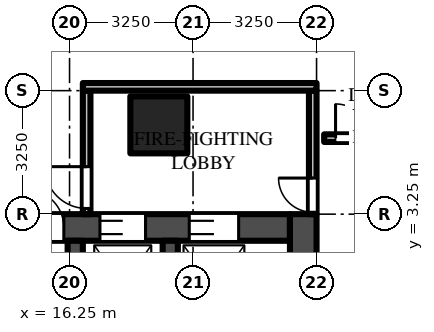
"""IFC4 building model, lengths in metres.
Left out: names, types, materials, properties, quantities, classifications, styles, units other than length and angle.
Written with IfcOpenShell. Run it as: python <this file> out.ifc"""

import sys

from ifc_helpers import new_model, si_unit, direction, frame, frame_2d, origin, origin_2d, place, context, subcontext, project, spatial, rectangle, extrude, source, transform, mapped, element, fill, save


model = new_model("IFC4")
c1 = context("Model", 3, precision=1e-05, world=origin(), true_north=direction((0.0, 1.0)))
c2 = subcontext(c1, "Body", "Model", "MODEL_VIEW")
j1 = project(units=[si_unit("LENGTHUNIT", "METRE"), si_unit("PLANEANGLEUNIT", "RADIAN")], contexts=[c1])
p1 = place(None, origin())
s1 = spatial("IfcSite", under=j1, at=p1, CompositionType="ELEMENT")
p2 = place(p1, origin())
s2 = spatial("IfcBuilding", under=s1, at=p2, CompositionType="ELEMENT")
p3 = place(p2, frame((0.0, 0.0, 24.0)))
s3 = spatial("IfcBuildingStorey", under=s2, at=p3, CompositionType="ELEMENT", Elevation=24.0)
m1 = source(origin(), c2, "Body", "SweptSolid", [
    extrude(rectangle(XDim=1.5, YDim=1.5, at=origin_2d()), origin(), (0.0, 0.0, 1.0), 5.0),
])
p4 = place(p3, frame((18.6, 5.6, 0.0), z_axis=(0.0, 0.0, 1.0), x_axis=(1.0, 0.0, 0.0)))
e1 = element("IfcColumn", 1, at=p4, inside=s3, PredefinedType="COLUMN", context=c2, shape_type="MappedRepresentation", body=[
    mapped(m1, transform((0.0, 0.0, 0.0))),
])
m2 = source(origin(), c2, "Body", "SweptSolid", [
    extrude(rectangle(XDim=14.85, YDim=0.7, at=frame_2d((7.425, 0.0))), origin(), (0.0, 0.0, 1.0), 4.7),
])
p5 = place(p3, frame((7.2, 2.9, 0.0), z_axis=(0.0, 0.0, 1.0), x_axis=(1.0, 0.0, 0.0)))
e2 = element("IfcWall", 2, at=p5, inside=s3, PredefinedType="SHEAR", context=c2, shape_type="MappedRepresentation", body=[
    mapped(m2, transform((0.0, 0.0, 0.0))),
])
m3 = source(origin(), c2, "Body", "SweptSolid", [
    extrude(rectangle(XDim=1.3, YDim=2.1, at=frame_2d((0.65, 1.05))), frame((0.0, 0.36, 0.0), z_axis=(0.0, -1.0, 0.0), x_axis=(1.0, 0.0, 0.0)), (0.0, 0.0, 1.0), 0.72),
])
p6 = place(p5, frame((12.2, 0.0, 0.0)))
e3 = element("IfcOpeningElement", 3, at=p6, cuts=e2, PredefinedType="OPENING", context=c2, shape_type="MappedRepresentation", body=[
    mapped(m3, transform((0.0, 0.0, 0.0))),
])
m4 = source(origin(), c2, "Body", "SweptSolid", [
    extrude(rectangle(XDim=1.2, YDim=2.1, at=frame_2d((0.6, 1.05))), frame((0.0, 0.36, 0.0), z_axis=(0.0, -1.0, 0.0), x_axis=(1.0, 0.0, 0.0)), (0.0, 0.0, 1.0), 0.72),
])
p7 = place(p5, frame((9.85, 0.0, 0.0)))
e4 = element("IfcOpeningElement", 4, at=p7, cuts=e2, PredefinedType="OPENING", context=c2, shape_type="MappedRepresentation", body=[
    mapped(m4, transform((0.0, 0.0, 0.0))),
])
m5 = source(origin(), c2, "Body", "SweptSolid", [
    extrude(rectangle(XDim=1.0, YDim=2.1, at=frame_2d((0.5, 1.05))), frame((0.0, 0.36, 0.0), z_axis=(0.0, -1.0, 0.0), x_axis=(1.0, 0.0, 0.0)), (0.0, 0.0, 1.0), 0.72),
])
p8 = place(p5, frame((7.9, 0.0, 0.0)))
e5 = element("IfcOpeningElement", 5, at=p8, cuts=e2, PredefinedType="OPENING", context=c2, shape_type="MappedRepresentation", body=[
    mapped(m5, transform((0.0, 0.0, 0.0))),
])
m6 = source(origin(), c2, "Body", "SweptSolid", [
    extrude(rectangle(XDim=0.8, YDim=2.1, at=frame_2d((0.4, 1.05))), frame((0.0, 0.36, 0.0), z_axis=(0.0, -1.0, 0.0), x_axis=(1.0, 0.0, 0.0)), (0.0, 0.0, 1.0), 0.72),
])
p9 = place(p5, frame((0.113, 0.0, 0.0)))
e6 = element("IfcOpeningElement", 6, at=p9, cuts=e2, PredefinedType="OPENING", context=c2, shape_type="MappedRepresentation", body=[
    mapped(m6, transform((0.0, 0.0, 0.0))),
])
p10 = place(p5, frame((1.288, 0.0, 0.0)))
e7 = element("IfcOpeningElement", 7, at=p10, cuts=e2, PredefinedType="OPENING", context=c2, shape_type="MappedRepresentation", body=[
    mapped(m6, transform((0.0, 0.0, 0.0))),
])
p11 = place(p5, frame((2.712, 0.0, 0.0)))
e8 = element("IfcOpeningElement", 8, at=p11, cuts=e2, PredefinedType="OPENING", context=c2, shape_type="MappedRepresentation", body=[
    mapped(m6, transform((0.0, 0.0, 0.0))),
])
p12 = place(p5, frame((3.887, 0.0, 0.0)))
e9 = element("IfcOpeningElement", 9, at=p12, cuts=e2, PredefinedType="OPENING", context=c2, shape_type="MappedRepresentation", body=[
    mapped(m6, transform((0.0, 0.0, 0.0))),
])
p13 = place(p5, frame((5.312, 0.0, 0.0)))
e10 = element("IfcOpeningElement", 10, at=p13, cuts=e2, PredefinedType="OPENING", context=c2, shape_type="MappedRepresentation", body=[
    mapped(m6, transform((0.0, 0.0, 0.0))),
])
p14 = place(p5, frame((6.488, 0.0, 0.0)))
e11 = element("IfcOpeningElement", 11, at=p14, cuts=e2, PredefinedType="OPENING", context=c2, shape_type="MappedRepresentation", body=[
    mapped(m6, transform((0.0, 0.0, 0.0))),
])
m7 = source(origin(), c2, "Body", "SweptSolid", [
    extrude(rectangle(XDim=9.05, YDim=0.7, at=frame_2d((4.525, 0.0))), origin(), (0.0, 0.0, 1.0), 4.7),
])
p15 = place(p3, frame((22.4, -5.8, 0.0), z_axis=(0.0, 0.0, 1.0), x_axis=(0.0, 1.0, 0.0)))
e12 = element("IfcWall", 12, at=p15, inside=s3, PredefinedType="SHEAR", context=c2, shape_type="MappedRepresentation", body=[
    mapped(m7, transform((0.0, 0.0, 0.0))),
])
m8 = source(origin(), c2, "Body", "SweptSolid", [
    extrude(rectangle(XDim=2.45, YDim=0.4, at=frame_2d((1.225, 0.0))), origin(), (0.0, 0.0, 1.0), 4.7),
])
for number, where, z_axis, x_axis in (
    (13, (16.4, 0.1, 0.0), (0.0, 0.0, 1.0), (0.0, 1.0, 0.0)),
    (14, (18.9, 0.1, 0.0), (0.0, 0.0, 1.0), (0.0, 1.0, 0.0)),
):
    element("IfcWall", number, at=place(p3, frame(where, z_axis=z_axis, x_axis=x_axis)), inside=s3, PredefinedType="SHEAR", context=c2, shape_type="MappedRepresentation", body=[
        mapped(m8, transform((0.0, 0.0, 0.0))),
    ])
m9 = source(origin(), c2, "Body", "SweptSolid", [
    extrude(rectangle(XDim=3.25, YDim=0.2, at=frame_2d((1.625, 0.0))), origin(), (0.0, 0.0, 1.0), 4.7),
])
p16 = place(p3, frame((16.7, 3.25, 0.0), z_axis=(0.0, 0.0, 1.0), x_axis=(0.0, 1.0, 0.0)))
e15 = element("IfcWall", 15, at=p16, inside=s3, PredefinedType="PARTITIONING", context=c2, shape_type="MappedRepresentation", body=[
    mapped(m9, transform((0.0, 0.0, 0.0))),
])
m10 = source(origin(), c2, "Body", "SweptSolid", [
    extrude(rectangle(XDim=1.1, YDim=2.1, at=frame_2d((0.55, 1.05))), frame((0.0, 0.11, 0.0), z_axis=(0.0, -1.0, 0.0), x_axis=(1.0, 0.0, 0.0)), (0.0, 0.0, 1.0), 0.22),
])
p17 = place(p16, frame((0.15, 0.0, 0.0)))
e16 = element("IfcOpeningElement", 16, at=p17, cuts=e15, PredefinedType="OPENING", context=c2, shape_type="MappedRepresentation", body=[
    mapped(m10, transform((0.0, 0.0, 0.0))),
])
p18 = place(p3, frame((22.65, 3.25, 0.0), z_axis=(0.0, 0.0, 1.0), x_axis=(0.0, 1.0, 0.0)))
e17 = element("IfcWall", 17, at=p18, inside=s3, PredefinedType="PARTITIONING", context=c2, shape_type="MappedRepresentation", body=[
    mapped(m9, transform((0.0, 0.0, 0.0))),
])
m11 = source(origin(), c2, "Body", "SweptSolid", [
    extrude(rectangle(XDim=0.9, YDim=2.1, at=frame_2d((0.45, 1.05))), frame((0.0, 0.11, 0.0), z_axis=(0.0, -1.0, 0.0), x_axis=(1.0, 0.0, 0.0)), (0.0, 0.0, 1.0), 0.22),
])
p19 = place(p18, frame((0.05, 0.0, 0.0)))
e18 = element("IfcOpeningElement", 18, at=p19, cuts=e17, PredefinedType="OPENING", context=c2, shape_type="MappedRepresentation", body=[
    mapped(m11, transform((0.0, 0.0, 0.0))),
])
m12 = source(origin(), c2, "Body", "SweptSolid", [
    extrude(rectangle(XDim=6.15, YDim=0.2, at=frame_2d((3.075, 0.0))), origin(), (0.0, 0.0, 1.0), 4.7),
])
p20 = place(p3, frame((16.6, 6.6, 0.0), z_axis=(0.0, 0.0, 1.0), x_axis=(1.0, 0.0, 0.0)))
e19 = element("IfcWall", 19, at=p20, inside=s3, PredefinedType="PARTITIONING", context=c2, shape_type="MappedRepresentation", body=[
    mapped(m12, transform((0.0, 0.0, 0.0))),
])
m13 = source(origin(), c2, "Body", "SweptSolid", [
    extrude(rectangle(XDim=2.5, YDim=0.2, at=frame_2d((1.25, 0.0))), origin(), (0.0, 0.0, 1.0), 4.7),
])
p21 = place(p3, frame((22.95, 5.25, 0.0), z_axis=(0.0, 0.0, 1.0), x_axis=(1.0, 0.0, 0.0)))
e20 = element("IfcWall", 20, at=p21, inside=s3, PredefinedType="PARTITIONING", context=c2, shape_type="MappedRepresentation", body=[
    mapped(m13, transform((0.0, 0.0, 0.0))),
])
m14 = source(origin(), c2, "Body", "SweptSolid", [
    extrude(rectangle(XDim=1.8, YDim=2.1, at=frame_2d((0.9, 1.05))), frame((0.0, 0.11, 0.0), z_axis=(0.0, -1.0, 0.0), x_axis=(1.0, 0.0, 0.0)), (0.0, 0.0, 1.0), 0.22),
])
p22 = place(p21, frame((0.3, 0.0, 0.0)))
e21 = element("IfcOpeningElement", 21, at=p22, cuts=e20, PredefinedType="OPENING", context=c2, shape_type="MappedRepresentation", body=[
    mapped(m14, transform((0.0, 0.0, 0.0))),
])
m15 = source(origin(), c2, "Body", "SweptSolid", [
    extrude(rectangle(XDim=1.3, YDim=2.1, at=frame_2d((0.65, 1.05))), frame((0.0, -0.275, 0.0), z_axis=(0.0, -1.0, 0.0), x_axis=(1.0, 0.0, 0.0)), (0.0, 0.0, 1.0), 0.05),
])
p23 = place(p6, origin())
e22 = element("IfcDoor", 22, at=p23, inside=s3, OperationType="DOUBLE_DOOR_SLIDING", PredefinedType="DOOR", context=c2, shape_type="MappedRepresentation", body=[
    mapped(m15, transform((0.0, 0.0, 0.0))),
])
fill(e3, e22)
m16 = source(origin(), c2, "Body", "SweptSolid", [
    extrude(rectangle(XDim=1.2, YDim=2.1, at=frame_2d((0.6, 1.05))), frame((0.0, -0.275, 0.0), z_axis=(0.0, -1.0, 0.0), x_axis=(1.0, 0.0, 0.0)), (0.0, 0.0, 1.0), 0.05),
])
p24 = place(p7, origin())
e23 = element("IfcDoor", 23, at=p24, inside=s3, OperationType="DOUBLE_DOOR_SLIDING", PredefinedType="DOOR", context=c2, shape_type="MappedRepresentation", body=[
    mapped(m16, transform((0.0, 0.0, 0.0))),
])
fill(e4, e23)
m17 = source(origin(), c2, "Body", "SweptSolid", [
    extrude(rectangle(XDim=1.0, YDim=2.1, at=frame_2d((0.5, 1.05))), frame((0.0, -0.275, 0.0), z_axis=(0.0, -1.0, 0.0), x_axis=(1.0, 0.0, 0.0)), (0.0, 0.0, 1.0), 0.05),
])
p25 = place(p8, origin())
e24 = element("IfcDoor", 24, at=p25, inside=s3, OperationType="SINGLE_SWING_LEFT", PredefinedType="DOOR", context=c2, shape_type="MappedRepresentation", body=[
    mapped(m17, transform((0.0, 0.0, 0.0))),
])
fill(e5, e24)
m18 = source(origin(), c2, "Body", "SweptSolid", [
    extrude(rectangle(XDim=1.1, YDim=2.1, at=frame_2d((0.55, 1.05))), frame((0.0, 0.025, 0.0), z_axis=(0.0, -1.0, 0.0), x_axis=(1.0, 0.0, 0.0)), (0.0, 0.0, 1.0), 0.05),
])
p26 = place(p17, origin())
e25 = element("IfcDoor", 25, at=p26, inside=s3, OperationType="SINGLE_SWING_RIGHT", PredefinedType="DOOR", context=c2, shape_type="MappedRepresentation", body=[
    mapped(m18, transform((0.0, 0.0, 0.0))),
])
fill(e16, e25)
m19 = source(origin(), c2, "Body", "SweptSolid", [
    extrude(rectangle(XDim=0.9, YDim=2.1, at=frame_2d((0.45, 1.05))), frame((0.0, 0.025, 0.0), z_axis=(0.0, -1.0, 0.0), x_axis=(1.0, 0.0, 0.0)), (0.0, 0.0, 1.0), 0.05),
])
p27 = place(p19, origin())
e26 = element("IfcDoor", 26, at=p27, inside=s3, OperationType="SINGLE_SWING_RIGHT", PredefinedType="DOOR", context=c2, shape_type="MappedRepresentation", body=[
    mapped(m19, transform((0.0, 0.0, 0.0))),
])
fill(e18, e26)
m20 = source(origin(), c2, "Body", "SweptSolid", [
    extrude(rectangle(XDim=1.8, YDim=2.1, at=frame_2d((0.9, 1.05))), frame((0.0, 0.025, 0.0), z_axis=(0.0, -1.0, 0.0), x_axis=(1.0, 0.0, 0.0)), (0.0, 0.0, 1.0), 0.05),
])
p28 = place(p22, origin())
e27 = element("IfcDoor", 27, at=p28, inside=s3, OperationType="DOUBLE_DOOR_SINGLE_SWING", PredefinedType="DOOR", context=c2, shape_type="MappedRepresentation", body=[
    mapped(m20, transform((0.0, 0.0, 0.0))),
])
fill(e21, e27)
save(model, sys.argv[1])
